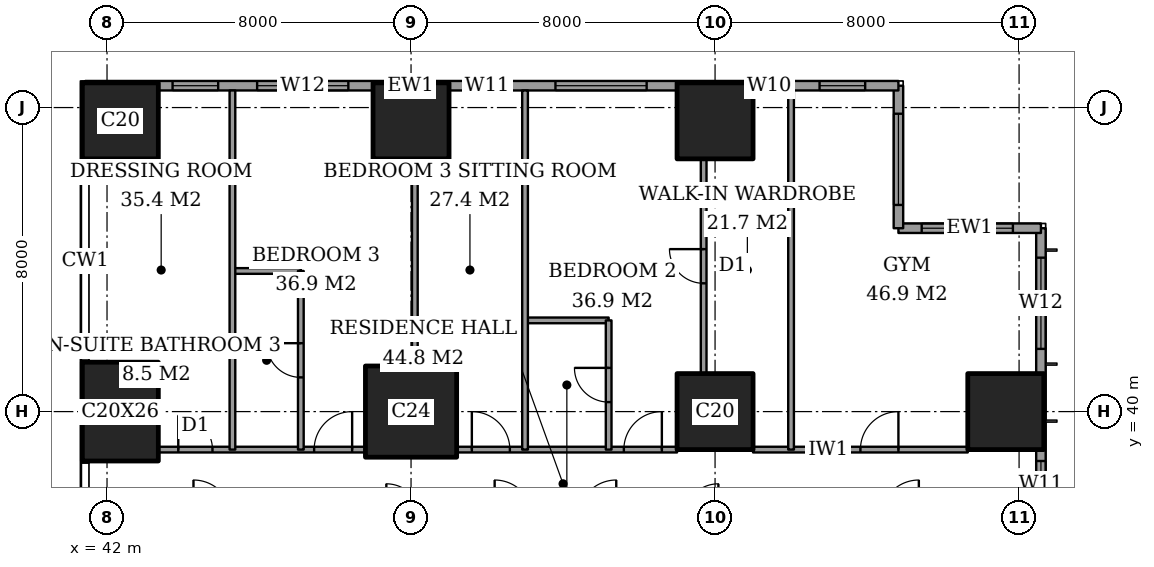
"""IFC4 building model, lengths in metres.
Left out: names, types, materials, properties, quantities, classifications, styles, units other than length and angle.
Written with IfcOpenShell. Run it as: python <this file> out.ifc"""

import sys

from ifc_helpers import new_model, si_unit, direction, frame, frame_2d, origin, origin_2d, place, context, subcontext, project, spatial, rectangle, extrude, element, fill, save


model = new_model("IFC4")
c1 = context("Model", 3, precision=1e-05, world=origin(), true_north=direction((0.0, 1.0)))
c2 = subcontext(c1, "Body", "Model", "MODEL_VIEW")
j1 = project(units=[si_unit("LENGTHUNIT", "METRE"), si_unit("PLANEANGLEUNIT", "RADIAN")], contexts=[c1])
p1 = place(None, origin())
s1 = spatial("IfcSite", under=j1, at=p1, CompositionType="ELEMENT")
p2 = place(p1, origin())
s2 = spatial("IfcBuilding", under=s1, at=p2, CompositionType="ELEMENT")
p3 = place(p2, frame((0.0, 0.0, 150.2)))
s3 = spatial("IfcBuildingStorey", under=s2, at=p3, CompositionType="ELEMENT", Elevation=150.2)
p4 = place(p3, frame((42.35, 40.0, 0.0), z_axis=(0.0, 0.0, 1.0), x_axis=(1.0, 0.0, 0.0)))
e1 = element("IfcColumn", 1, at=p4, inside=s3, PredefinedType="COLUMN", context=c2, shape_type="SweptSolid", body=[
    extrude(rectangle(XDim=2.0, YDim=2.6, at=origin_2d()), origin(), (0.0, 0.0, 1.0), 3.6),
])
p5 = place(p3, frame((42.35, 47.65, 0.0), z_axis=(0.0, 0.0, 1.0), x_axis=(1.0, 0.0, 0.0)))
e2 = element("IfcColumn", 2, at=p5, inside=s3, PredefinedType="COLUMN", context=c2, shape_type="SweptSolid", body=[
    extrude(rectangle(XDim=2.0, YDim=2.0, at=origin_2d()), origin(), (0.0, 0.0, 1.0), 3.6),
])
p6 = place(p3, frame((50.0, 40.0, 0.0), z_axis=(0.0, 0.0, 1.0), x_axis=(1.0, 0.0, 0.0)))
e3 = element("IfcColumn", 3, at=p6, inside=s3, PredefinedType="COLUMN", context=c2, shape_type="SweptSolid", body=[
    extrude(rectangle(XDim=2.4, YDim=2.4, at=origin_2d()), origin(), (0.0, 0.0, 1.0), 3.6),
])
for number, where, z_axis, x_axis in (
    (4, (50.0, 47.65, 0.0), (0.0, 0.0, 1.0), (1.0, 0.0, 0.0)),
    (5, (58.0, 40.0, 0.0), (0.0, 0.0, 1.0), (1.0, 0.0, 0.0)),
    (6, (58.0, 47.65, 0.0), (0.0, 0.0, 1.0), (1.0, 0.0, 0.0)),
    (7, (65.65, 40.0, 0.0), (0.0, 0.0, 1.0), (1.0, 0.0, 0.0)),
):
    element("IfcColumn", number, at=place(p3, frame(where, z_axis=z_axis, x_axis=x_axis)), inside=s3, PredefinedType="COLUMN", context=c2, shape_type="SweptSolid", body=[
        extrude(rectangle(XDim=2.0, YDim=2.0, at=origin_2d()), origin(), (0.0, 0.0, 1.0), 3.6),
    ])
p7 = place(p3, frame((66.575, 3.175, 0.0), z_axis=(0.0, 0.0, 1.0), x_axis=(0.0, 1.0, 0.0)))
e8 = element("IfcWall", 8, at=p7, inside=s3, PredefinedType="SOLIDWALL", context=c2, shape_type="SweptSolid", body=[
    extrude(rectangle(XDim=41.65, YDim=0.25, at=frame_2d((20.825, 0.0))), origin(), (0.0, 0.0, 1.0), 3.6),
])
p8 = place(p7, frame((0.775, 0.0, 0.4)))
e9 = element("IfcOpeningElement", 9, at=p8, cuts=e8, PredefinedType="OPENING", context=c2, shape_type="SweptSolid", body=[
    extrude(rectangle(XDim=2.4, YDim=2.2, at=frame_2d((1.2, 1.1))), frame((0.0, 0.135, 0.0), z_axis=(0.0, -1.0, 0.0), x_axis=(1.0, 0.0, 0.0)), (0.0, 0.0, 1.0), 0.27),
])
p9 = place(p7, frame((6.1, 0.0, 0.4)))
e10 = element("IfcOpeningElement", 10, at=p9, cuts=e8, PredefinedType="OPENING", context=c2, shape_type="SweptSolid", body=[
    extrude(rectangle(XDim=1.2, YDim=2.2, at=frame_2d((0.6, 1.1))), frame((0.0, 0.135, 0.0), z_axis=(0.0, -1.0, 0.0), x_axis=(1.0, 0.0, 0.0)), (0.0, 0.0, 1.0), 0.27),
])
p10 = place(p7, frame((8.275, 0.0, 0.4)))
e11 = element("IfcOpeningElement", 11, at=p10, cuts=e8, PredefinedType="OPENING", context=c2, shape_type="SweptSolid", body=[
    extrude(rectangle(XDim=2.4, YDim=2.2, at=frame_2d((1.2, 1.1))), frame((0.0, 0.135, 0.0), z_axis=(0.0, -1.0, 0.0), x_axis=(1.0, 0.0, 0.0)), (0.0, 0.0, 1.0), 0.27),
])
p11 = place(p7, frame((15.775, 0.0, 0.4)))
e12 = element("IfcOpeningElement", 12, at=p11, cuts=e8, PredefinedType="OPENING", context=c2, shape_type="SweptSolid", body=[
    extrude(rectangle(XDim=2.4, YDim=2.2, at=frame_2d((1.2, 1.1))), frame((0.0, 0.135, 0.0), z_axis=(0.0, -1.0, 0.0), x_axis=(1.0, 0.0, 0.0)), (0.0, 0.0, 1.0), 0.27),
])
p12 = place(p7, frame((23.475, 0.0, 0.4)))
e13 = element("IfcOpeningElement", 13, at=p12, cuts=e8, PredefinedType="OPENING", context=c2, shape_type="SweptSolid", body=[
    extrude(rectangle(XDim=2.4, YDim=2.2, at=frame_2d((1.2, 1.1))), frame((0.0, 0.135, 0.0), z_axis=(0.0, -1.0, 0.0), x_axis=(1.0, 0.0, 0.0)), (0.0, 0.0, 1.0), 0.27),
])
p13 = place(p7, frame((30.875, 0.0, 0.4)))
e14 = element("IfcOpeningElement", 14, at=p13, cuts=e8, PredefinedType="OPENING", context=c2, shape_type="SweptSolid", body=[
    extrude(rectangle(XDim=2.4, YDim=2.2, at=frame_2d((1.2, 1.1))), frame((0.0, 0.135, 0.0), z_axis=(0.0, -1.0, 0.0), x_axis=(1.0, 0.0, 0.0)), (0.0, 0.0, 1.0), 0.27),
])
p14 = place(p7, frame((34.325, 0.0, 0.4)))
e15 = element("IfcOpeningElement", 15, at=p14, cuts=e8, PredefinedType="OPENING", context=c2, shape_type="SweptSolid", body=[
    extrude(rectangle(XDim=1.2, YDim=2.2, at=frame_2d((0.6, 1.1))), frame((0.0, 0.135, 0.0), z_axis=(0.0, -1.0, 0.0), x_axis=(1.0, 0.0, 0.0)), (0.0, 0.0, 1.0), 0.27),
])
p15 = place(p7, frame((38.475, 0.0, 0.4)))
e16 = element("IfcOpeningElement", 16, at=p15, cuts=e8, PredefinedType="OPENING", context=c2, shape_type="SweptSolid", body=[
    extrude(rectangle(XDim=2.4, YDim=2.2, at=frame_2d((1.2, 1.1))), frame((0.0, 0.135, 0.0), z_axis=(0.0, -1.0, 0.0), x_axis=(1.0, 0.0, 0.0)), (0.0, 0.0, 1.0), 0.27),
])
p16 = place(p3, frame((66.575, 44.825, 0.0), z_axis=(0.0, 0.0, 1.0), x_axis=(-1.0, 0.0, 0.0)))
e17 = element("IfcWall", 17, at=p16, inside=s3, PredefinedType="SOLIDWALL", context=c2, shape_type="SweptSolid", body=[
    extrude(rectangle(XDim=3.75, YDim=0.25, at=frame_2d((1.875, 0.0))), origin(), (0.0, 0.0, 1.0), 3.6),
])
p17 = place(p16, frame((0.738, 0.0, 0.4)))
e18 = element("IfcOpeningElement", 18, at=p17, cuts=e17, PredefinedType="OPENING", context=c2, shape_type="SweptSolid", body=[
    extrude(rectangle(XDim=2.4, YDim=2.2, at=frame_2d((1.2, 1.1))), frame((0.0, 0.135, 0.0), z_axis=(0.0, -1.0, 0.0), x_axis=(1.0, 0.0, 0.0)), (0.0, 0.0, 1.0), 0.27),
])
p18 = place(p3, frame((62.825, 44.825, 0.0), z_axis=(0.0, 0.0, 1.0), x_axis=(0.0, 1.0, 0.0)))
e19 = element("IfcWall", 19, at=p18, inside=s3, PredefinedType="SOLIDWALL", context=c2, shape_type="SweptSolid", body=[
    extrude(rectangle(XDim=3.75, YDim=0.25, at=frame_2d((1.875, 0.0))), origin(), (0.0, 0.0, 1.0), 3.6),
])
p19 = place(p18, frame((0.613, 0.0, 0.4)))
e20 = element("IfcOpeningElement", 20, at=p19, cuts=e19, PredefinedType="OPENING", context=c2, shape_type="SweptSolid", body=[
    extrude(rectangle(XDim=2.4, YDim=2.2, at=frame_2d((1.2, 1.1))), frame((0.0, 0.135, 0.0), z_axis=(0.0, -1.0, 0.0), x_axis=(1.0, 0.0, 0.0)), (0.0, 0.0, 1.0), 0.27),
])
p20 = place(p3, frame((62.825, 48.575, 0.0), z_axis=(0.0, 0.0, 1.0), x_axis=(-1.0, 0.0, 0.0)))
e21 = element("IfcWall", 21, at=p20, inside=s3, PredefinedType="SOLIDWALL", context=c2, shape_type="SweptSolid", body=[
    extrude(rectangle(XDim=21.4, YDim=0.25, at=frame_2d((10.7, 0.0))), origin(), (0.0, 0.0, 1.0), 3.6),
])
p21 = place(p20, frame((0.875, 0.0, 0.4)))
e22 = element("IfcOpeningElement", 22, at=p21, cuts=e21, PredefinedType="OPENING", context=c2, shape_type="SweptSolid", body=[
    extrude(rectangle(XDim=1.2, YDim=2.2, at=frame_2d((0.6, 1.1))), frame((0.0, 0.135, 0.0), z_axis=(0.0, -1.0, 0.0), x_axis=(1.0, 0.0, 0.0)), (0.0, 0.0, 1.0), 0.27),
])
p22 = place(p20, frame((3.1, 0.0, 0.4)))
e23 = element("IfcOpeningElement", 23, at=p22, cuts=e21, PredefinedType="OPENING", context=c2, shape_type="SweptSolid", body=[
    extrude(rectangle(XDim=0.6, YDim=2.2, at=frame_2d((0.3, 1.1))), frame((0.0, 0.135, 0.0), z_axis=(0.0, -1.0, 0.0), x_axis=(1.0, 0.0, 0.0)), (0.0, 0.0, 1.0), 0.27),
])
p23 = place(p20, frame((6.625, 0.0, 0.4)))
e24 = element("IfcOpeningElement", 24, at=p23, cuts=e21, PredefinedType="OPENING", context=c2, shape_type="SweptSolid", body=[
    extrude(rectangle(XDim=2.4, YDim=2.2, at=frame_2d((1.2, 1.1))), frame((0.0, 0.135, 0.0), z_axis=(0.0, -1.0, 0.0), x_axis=(1.0, 0.0, 0.0)), (0.0, 0.0, 1.0), 0.27),
])
p24 = place(p20, frame((10.225, 0.0, 0.4)))
e25 = element("IfcOpeningElement", 25, at=p24, cuts=e21, PredefinedType="OPENING", context=c2, shape_type="SweptSolid", body=[
    extrude(rectangle(XDim=1.2, YDim=2.2, at=frame_2d((0.6, 1.1))), frame((0.0, 0.135, 0.0), z_axis=(0.0, -1.0, 0.0), x_axis=(1.0, 0.0, 0.0)), (0.0, 0.0, 1.0), 0.27),
])
p25 = place(p20, frame((14.475, 0.0, 0.4)))
e26 = element("IfcOpeningElement", 26, at=p25, cuts=e21, PredefinedType="OPENING", context=c2, shape_type="SweptSolid", body=[
    extrude(rectangle(XDim=2.4, YDim=2.2, at=frame_2d((1.2, 1.1))), frame((0.0, 0.135, 0.0), z_axis=(0.0, -1.0, 0.0), x_axis=(1.0, 0.0, 0.0)), (0.0, 0.0, 1.0), 0.27),
])
p26 = place(p20, frame((17.9, 0.0, 0.4)))
e27 = element("IfcOpeningElement", 27, at=p26, cuts=e21, PredefinedType="OPENING", context=c2, shape_type="SweptSolid", body=[
    extrude(rectangle(XDim=1.2, YDim=2.2, at=frame_2d((0.6, 1.1))), frame((0.0, 0.135, 0.0), z_axis=(0.0, -1.0, 0.0), x_axis=(1.0, 0.0, 0.0)), (0.0, 0.0, 1.0), 0.27),
])
p27 = place(p3, frame((43.35, 39.0, 0.0), z_axis=(0.0, 0.0, 1.0), x_axis=(1.0, 0.0, 0.0)))
e28 = element("IfcWall", 28, at=p27, inside=s3, PredefinedType="PARTITIONING", context=c2, shape_type="SweptSolid", body=[
    extrude(rectangle(XDim=5.45, YDim=0.15, at=frame_2d((2.725, 0.0))), origin(), (0.0, 0.0, 1.0), 3.35),
])
p28 = place(p27, frame((4.1, 0.0, 0.0)))
e29 = element("IfcOpeningElement", 29, at=p28, cuts=e28, PredefinedType="OPENING", context=c2, shape_type="SweptSolid", body=[
    extrude(rectangle(XDim=1.0, YDim=2.1, at=frame_2d((0.5, 1.05))), frame((0.0, 0.085, 0.0), z_axis=(0.0, -1.0, 0.0), x_axis=(1.0, 0.0, 0.0)), (0.0, 0.0, 1.0), 0.17),
])
p29 = place(p27, frame((0.525, 0.0, 0.0)))
e30 = element("IfcOpeningElement", 30, at=p29, cuts=e28, PredefinedType="OPENING", context=c2, shape_type="SweptSolid", body=[
    extrude(rectangle(XDim=0.9, YDim=2.1, at=frame_2d((0.45, 1.05))), frame((0.0, 0.085, 0.0), z_axis=(0.0, -1.0, 0.0), x_axis=(1.0, 0.0, 0.0)), (0.0, 0.0, 1.0), 0.17),
])
p30 = place(p3, frame((51.2, 39.0, 0.0), z_axis=(0.0, 0.0, 1.0), x_axis=(1.0, 0.0, 0.0)))
e31 = element("IfcWall", 31, at=p30, inside=s3, PredefinedType="PARTITIONING", context=c2, shape_type="SweptSolid", body=[
    extrude(rectangle(XDim=5.8, YDim=0.15, at=frame_2d((2.9, 0.0))), origin(), (0.0, 0.0, 1.0), 3.35),
])
p31 = place(p30, frame((4.4, 0.0, 0.0)))
e32 = element("IfcOpeningElement", 32, at=p31, cuts=e31, PredefinedType="OPENING", context=c2, shape_type="SweptSolid", body=[
    extrude(rectangle(XDim=1.0, YDim=2.1, at=frame_2d((0.5, 1.05))), frame((0.0, 0.085, 0.0), z_axis=(0.0, -1.0, 0.0), x_axis=(1.0, 0.0, 0.0)), (0.0, 0.0, 1.0), 0.17),
])
p32 = place(p30, frame((0.4, 0.0, 0.0)))
e33 = element("IfcOpeningElement", 33, at=p32, cuts=e31, PredefinedType="OPENING", context=c2, shape_type="SweptSolid", body=[
    extrude(rectangle(XDim=1.0, YDim=2.1, at=frame_2d((0.5, 1.05))), frame((0.0, 0.085, 0.0), z_axis=(0.0, -1.0, 0.0), x_axis=(1.0, 0.0, 0.0)), (0.0, 0.0, 1.0), 0.17),
])
p33 = place(p3, frame((59.0, 39.0, 0.0), z_axis=(0.0, 0.0, 1.0), x_axis=(1.0, 0.0, 0.0)))
e34 = element("IfcWall", 34, at=p33, inside=s3, PredefinedType="PARTITIONING", context=c2, shape_type="SweptSolid", body=[
    extrude(rectangle(XDim=5.65, YDim=0.15, at=frame_2d((2.825, 0.0))), origin(), (0.0, 0.0, 1.0), 3.35),
])
p34 = place(p33, frame((2.825, 0.0, 0.0)))
e35 = element("IfcOpeningElement", 35, at=p34, cuts=e34, PredefinedType="OPENING", context=c2, shape_type="SweptSolid", body=[
    extrude(rectangle(XDim=1.0, YDim=2.1, at=frame_2d((0.5, 1.05))), frame((0.0, 0.085, 0.0), z_axis=(0.0, -1.0, 0.0), x_axis=(1.0, 0.0, 0.0)), (0.0, 0.0, 1.0), 0.17),
])
p35 = place(p3, frame((53.0, 42.4, 0.0), z_axis=(0.0, 0.0, 1.0), x_axis=(1.0, 0.0, 0.0)))
e36 = element("IfcWall", 36, at=p35, inside=s3, PredefinedType="PARTITIONING", context=c2, shape_type="SweptSolid", body=[
    extrude(rectangle(XDim=2.2, YDim=0.15, at=frame_2d((1.1, 0.0))), origin(), (0.0, 0.0, 1.0), 3.35),
])
p36 = place(p3, frame((45.3, 43.7, 0.0), z_axis=(0.0, 0.0, 1.0), x_axis=(1.0, 0.0, 0.0)))
e37 = element("IfcWall", 37, at=p36, inside=s3, PredefinedType="PARTITIONING", context=c2, shape_type="SweptSolid", body=[
    extrude(rectangle(XDim=1.8, YDim=0.15, at=frame_2d((0.9, 0.0))), origin(), (0.0, 0.0, 1.0), 3.35),
])
p37 = place(p3, frame((45.3, 39.0, 0.0), z_axis=(0.0, 0.0, 1.0), x_axis=(0.0, 1.0, 0.0)))
e38 = element("IfcWall", 38, at=p37, inside=s3, PredefinedType="PARTITIONING", context=c2, shape_type="SweptSolid", body=[
    extrude(rectangle(XDim=9.45, YDim=0.15, at=frame_2d((4.725, 0.0))), origin(), (0.0, 0.0, 1.0), 3.35),
])
p38 = place(p3, frame((47.1, 39.0, 0.0), z_axis=(0.0, 0.0, 1.0), x_axis=(0.0, 1.0, 0.0)))
e39 = element("IfcWall", 39, at=p38, inside=s3, PredefinedType="PARTITIONING", context=c2, shape_type="SweptSolid", body=[
    extrude(rectangle(XDim=4.7, YDim=0.15, at=frame_2d((2.35, 0.0))), origin(), (0.0, 0.0, 1.0), 3.35),
])
p39 = place(p38, frame((1.9, 0.0, 0.0)))
e40 = element("IfcOpeningElement", 40, at=p39, cuts=e39, PredefinedType="OPENING", context=c2, shape_type="SweptSolid", body=[
    extrude(rectangle(XDim=0.9, YDim=2.1, at=frame_2d((0.45, 1.05))), frame((0.0, 0.085, 0.0), z_axis=(0.0, -1.0, 0.0), x_axis=(1.0, 0.0, 0.0)), (0.0, 0.0, 1.0), 0.17),
])
p40 = place(p3, frame((50.1, 41.2, 0.0), z_axis=(0.0, 0.0, 1.0), x_axis=(0.0, 1.0, 0.0)))
e41 = element("IfcWall", 41, at=p40, inside=s3, PredefinedType="PARTITIONING", context=c2, shape_type="SweptSolid", body=[
    extrude(rectangle(XDim=5.45, YDim=0.15, at=frame_2d((2.725, 0.0))), origin(), (0.0, 0.0, 1.0), 3.35),
])
p41 = place(p3, frame((53.0, 39.0, 0.0), z_axis=(0.0, 0.0, 1.0), x_axis=(0.0, 1.0, 0.0)))
e42 = element("IfcWall", 42, at=p41, inside=s3, PredefinedType="PARTITIONING", context=c2, shape_type="SweptSolid", body=[
    extrude(rectangle(XDim=9.45, YDim=0.15, at=frame_2d((4.725, 0.0))), origin(), (0.0, 0.0, 1.0), 3.35),
])
p42 = place(p3, frame((55.2, 39.0, 0.0), z_axis=(0.0, 0.0, 1.0), x_axis=(0.0, 1.0, 0.0)))
e43 = element("IfcWall", 43, at=p42, inside=s3, PredefinedType="PARTITIONING", context=c2, shape_type="SweptSolid", body=[
    extrude(rectangle(XDim=3.4, YDim=0.15, at=frame_2d((1.7, 0.0))), origin(), (0.0, 0.0, 1.0), 3.35),
])
p43 = place(p42, frame((1.25, 0.0, 0.0)))
e44 = element("IfcOpeningElement", 44, at=p43, cuts=e43, PredefinedType="OPENING", context=c2, shape_type="SweptSolid", body=[
    extrude(rectangle(XDim=0.9, YDim=2.1, at=frame_2d((0.45, 1.05))), frame((0.0, 0.085, 0.0), z_axis=(0.0, -1.0, 0.0), x_axis=(1.0, 0.0, 0.0)), (0.0, 0.0, 1.0), 0.17),
])
p44 = place(p3, frame((57.7, 41.0, 0.0), z_axis=(0.0, 0.0, 1.0), x_axis=(0.0, 1.0, 0.0)))
e45 = element("IfcWall", 45, at=p44, inside=s3, PredefinedType="PARTITIONING", context=c2, shape_type="SweptSolid", body=[
    extrude(rectangle(XDim=5.65, YDim=0.15, at=frame_2d((2.825, 0.0))), origin(), (0.0, 0.0, 1.0), 3.35),
])
p45 = place(p44, frame((2.375, 0.0, 0.0)))
e46 = element("IfcOpeningElement", 46, at=p45, cuts=e45, PredefinedType="OPENING", context=c2, shape_type="SweptSolid", body=[
    extrude(rectangle(XDim=0.9, YDim=2.1, at=frame_2d((0.45, 1.05))), frame((0.0, 0.085, 0.0), z_axis=(0.0, -1.0, 0.0), x_axis=(1.0, 0.0, 0.0)), (0.0, 0.0, 1.0), 0.17),
])
p46 = place(p3, frame((60.0, 39.0, 0.0), z_axis=(0.0, 0.0, 1.0), x_axis=(0.0, 1.0, 0.0)))
e47 = element("IfcWall", 47, at=p46, inside=s3, PredefinedType="PARTITIONING", context=c2, shape_type="SweptSolid", body=[
    extrude(rectangle(XDim=9.45, YDim=0.15, at=frame_2d((4.725, 0.0))), origin(), (0.0, 0.0, 1.0), 3.35),
])
p47 = place(p14, origin())
e48 = element("IfcWindow", 48, at=p47, inside=s3, PartitioningType="SINGLE_PANEL", PredefinedType="WINDOW", context=c2, shape_type="SweptSolid", body=[
    extrude(rectangle(XDim=1.2, YDim=2.2, at=frame_2d((0.6, 1.1))), frame((0.0, 0.03, 0.0), z_axis=(0.0, -1.0, 0.0), x_axis=(1.0, 0.0, 0.0)), (0.0, 0.0, 1.0), 0.06),
])
fill(e15, e48)
p48 = place(p15, origin())
e49 = element("IfcWindow", 49, at=p48, inside=s3, PartitioningType="SINGLE_PANEL", PredefinedType="WINDOW", context=c2, shape_type="SweptSolid", body=[
    extrude(rectangle(XDim=2.4, YDim=2.2, at=frame_2d((1.2, 1.1))), frame((0.0, 0.03, 0.0), z_axis=(0.0, -1.0, 0.0), x_axis=(1.0, 0.0, 0.0)), (0.0, 0.0, 1.0), 0.06),
])
fill(e16, e49)
p49 = place(p17, origin())
e50 = element("IfcWindow", 50, at=p49, inside=s3, PartitioningType="SINGLE_PANEL", PredefinedType="WINDOW", context=c2, shape_type="SweptSolid", body=[
    extrude(rectangle(XDim=2.4, YDim=2.2, at=frame_2d((1.2, 1.1))), frame((0.0, 0.03, 0.0), z_axis=(0.0, -1.0, 0.0), x_axis=(1.0, 0.0, 0.0)), (0.0, 0.0, 1.0), 0.06),
])
fill(e18, e50)
p50 = place(p19, origin())
e51 = element("IfcWindow", 51, at=p50, inside=s3, PartitioningType="SINGLE_PANEL", PredefinedType="WINDOW", context=c2, shape_type="SweptSolid", body=[
    extrude(rectangle(XDim=2.4, YDim=2.2, at=frame_2d((1.2, 1.1))), frame((0.0, 0.03, 0.0), z_axis=(0.0, -1.0, 0.0), x_axis=(1.0, 0.0, 0.0)), (0.0, 0.0, 1.0), 0.06),
])
fill(e20, e51)
p51 = place(p21, origin())
e52 = element("IfcWindow", 52, at=p51, inside=s3, PartitioningType="SINGLE_PANEL", PredefinedType="WINDOW", context=c2, shape_type="SweptSolid", body=[
    extrude(rectangle(XDim=1.2, YDim=2.2, at=frame_2d((0.6, 1.1))), frame((0.0, 0.03, 0.0), z_axis=(0.0, -1.0, 0.0), x_axis=(1.0, 0.0, 0.0)), (0.0, 0.0, 1.0), 0.06),
])
fill(e22, e52)
p52 = place(p22, origin())
e53 = element("IfcWindow", 53, at=p52, inside=s3, PartitioningType="SINGLE_PANEL", PredefinedType="WINDOW", context=c2, shape_type="SweptSolid", body=[
    extrude(rectangle(XDim=0.6, YDim=2.2, at=frame_2d((0.3, 1.1))), frame((0.0, 0.03, 0.0), z_axis=(0.0, -1.0, 0.0), x_axis=(1.0, 0.0, 0.0)), (0.0, 0.0, 1.0), 0.06),
])
fill(e23, e53)
p53 = place(p23, origin())
e54 = element("IfcWindow", 54, at=p53, inside=s3, PartitioningType="SINGLE_PANEL", PredefinedType="WINDOW", context=c2, shape_type="SweptSolid", body=[
    extrude(rectangle(XDim=2.4, YDim=2.2, at=frame_2d((1.2, 1.1))), frame((0.0, 0.03, 0.0), z_axis=(0.0, -1.0, 0.0), x_axis=(1.0, 0.0, 0.0)), (0.0, 0.0, 1.0), 0.06),
])
fill(e24, e54)
p54 = place(p24, origin())
e55 = element("IfcWindow", 55, at=p54, inside=s3, PartitioningType="SINGLE_PANEL", PredefinedType="WINDOW", context=c2, shape_type="SweptSolid", body=[
    extrude(rectangle(XDim=1.2, YDim=2.2, at=frame_2d((0.6, 1.1))), frame((0.0, 0.03, 0.0), z_axis=(0.0, -1.0, 0.0), x_axis=(1.0, 0.0, 0.0)), (0.0, 0.0, 1.0), 0.06),
])
fill(e25, e55)
p55 = place(p25, origin())
e56 = element("IfcWindow", 56, at=p55, inside=s3, PartitioningType="SINGLE_PANEL", PredefinedType="WINDOW", context=c2, shape_type="SweptSolid", body=[
    extrude(rectangle(XDim=2.4, YDim=2.2, at=frame_2d((1.2, 1.1))), frame((0.0, 0.03, 0.0), z_axis=(0.0, -1.0, 0.0), x_axis=(1.0, 0.0, 0.0)), (0.0, 0.0, 1.0), 0.06),
])
fill(e26, e56)
p56 = place(p26, origin())
e57 = element("IfcWindow", 57, at=p56, inside=s3, PartitioningType="SINGLE_PANEL", PredefinedType="WINDOW", context=c2, shape_type="SweptSolid", body=[
    extrude(rectangle(XDim=1.2, YDim=2.2, at=frame_2d((0.6, 1.1))), frame((0.0, 0.03, 0.0), z_axis=(0.0, -1.0, 0.0), x_axis=(1.0, 0.0, 0.0)), (0.0, 0.0, 1.0), 0.06),
])
fill(e27, e57)
p57 = place(p34, origin())
e58 = element("IfcDoor", 58, at=p57, inside=s3, OperationType="SINGLE_SWING_LEFT", PredefinedType="DOOR", context=c2, shape_type="SweptSolid", body=[
    extrude(rectangle(XDim=1.0, YDim=2.1, at=frame_2d((0.5, 1.05))), frame((0.0, 0.025, 0.0), z_axis=(0.0, -1.0, 0.0), x_axis=(1.0, 0.0, 0.0)), (0.0, 0.0, 1.0), 0.05),
])
fill(e35, e58)
p58 = place(p45, origin())
e59 = element("IfcDoor", 59, at=p58, inside=s3, OperationType="SINGLE_SWING_LEFT", PredefinedType="DOOR", context=c2, shape_type="SweptSolid", body=[
    extrude(rectangle(XDim=0.9, YDim=2.1, at=frame_2d((0.45, 1.05))), frame((0.0, 0.025, 0.0), z_axis=(0.0, -1.0, 0.0), x_axis=(1.0, 0.0, 0.0)), (0.0, 0.0, 1.0), 0.05),
])
fill(e46, e59)
p59 = place(p43, origin())
e60 = element("IfcDoor", 60, at=p59, inside=s3, OperationType="SINGLE_SWING_LEFT", PredefinedType="DOOR", context=c2, shape_type="SweptSolid", body=[
    extrude(rectangle(XDim=0.9, YDim=2.1, at=frame_2d((0.45, 1.05))), frame((0.0, 0.025, 0.0), z_axis=(0.0, -1.0, 0.0), x_axis=(1.0, 0.0, 0.0)), (0.0, 0.0, 1.0), 0.05),
])
fill(e44, e60)
p60 = place(p31, origin())
e61 = element("IfcDoor", 61, at=p60, inside=s3, OperationType="SINGLE_SWING_LEFT", PredefinedType="DOOR", context=c2, shape_type="SweptSolid", body=[
    extrude(rectangle(XDim=1.0, YDim=2.1, at=frame_2d((0.5, 1.05))), frame((0.0, 0.025, 0.0), z_axis=(0.0, -1.0, 0.0), x_axis=(1.0, 0.0, 0.0)), (0.0, 0.0, 1.0), 0.05),
])
fill(e32, e61)
p61 = place(p32, origin())
e62 = element("IfcDoor", 62, at=p61, inside=s3, OperationType="SINGLE_SWING_RIGHT", PredefinedType="DOOR", context=c2, shape_type="SweptSolid", body=[
    extrude(rectangle(XDim=1.0, YDim=2.1, at=frame_2d((0.5, 1.05))), frame((0.0, 0.025, 0.0), z_axis=(0.0, -1.0, 0.0), x_axis=(1.0, 0.0, 0.0)), (0.0, 0.0, 1.0), 0.05),
])
fill(e33, e62)
p62 = place(p39, origin())
e63 = element("IfcDoor", 63, at=p62, inside=s3, OperationType="SINGLE_SWING_LEFT", PredefinedType="DOOR", context=c2, shape_type="SweptSolid", body=[
    extrude(rectangle(XDim=0.9, YDim=2.1, at=frame_2d((0.45, 1.05))), frame((0.0, 0.025, 0.0), z_axis=(0.0, -1.0, 0.0), x_axis=(1.0, 0.0, 0.0)), (0.0, 0.0, 1.0), 0.05),
])
fill(e40, e63)
p63 = place(p28, origin())
e64 = element("IfcDoor", 64, at=p63, inside=s3, OperationType="SINGLE_SWING_LEFT", PredefinedType="DOOR", context=c2, shape_type="SweptSolid", body=[
    extrude(rectangle(XDim=1.0, YDim=2.1, at=frame_2d((0.5, 1.05))), frame((0.0, 0.025, 0.0), z_axis=(0.0, -1.0, 0.0), x_axis=(1.0, 0.0, 0.0)), (0.0, 0.0, 1.0), 0.05),
])
fill(e29, e64)
p64 = place(p29, origin())
e65 = element("IfcDoor", 65, at=p64, inside=s3, OperationType="SINGLE_SWING_RIGHT", PredefinedType="DOOR", context=c2, shape_type="SweptSolid", body=[
    extrude(rectangle(XDim=0.9, YDim=2.1, at=frame_2d((0.45, 1.05))), frame((0.0, 0.025, 0.0), z_axis=(0.0, -1.0, 0.0), x_axis=(1.0, 0.0, 0.0)), (0.0, 0.0, 1.0), 0.05),
])
fill(e30, e65)
save(model, sys.argv[1])
